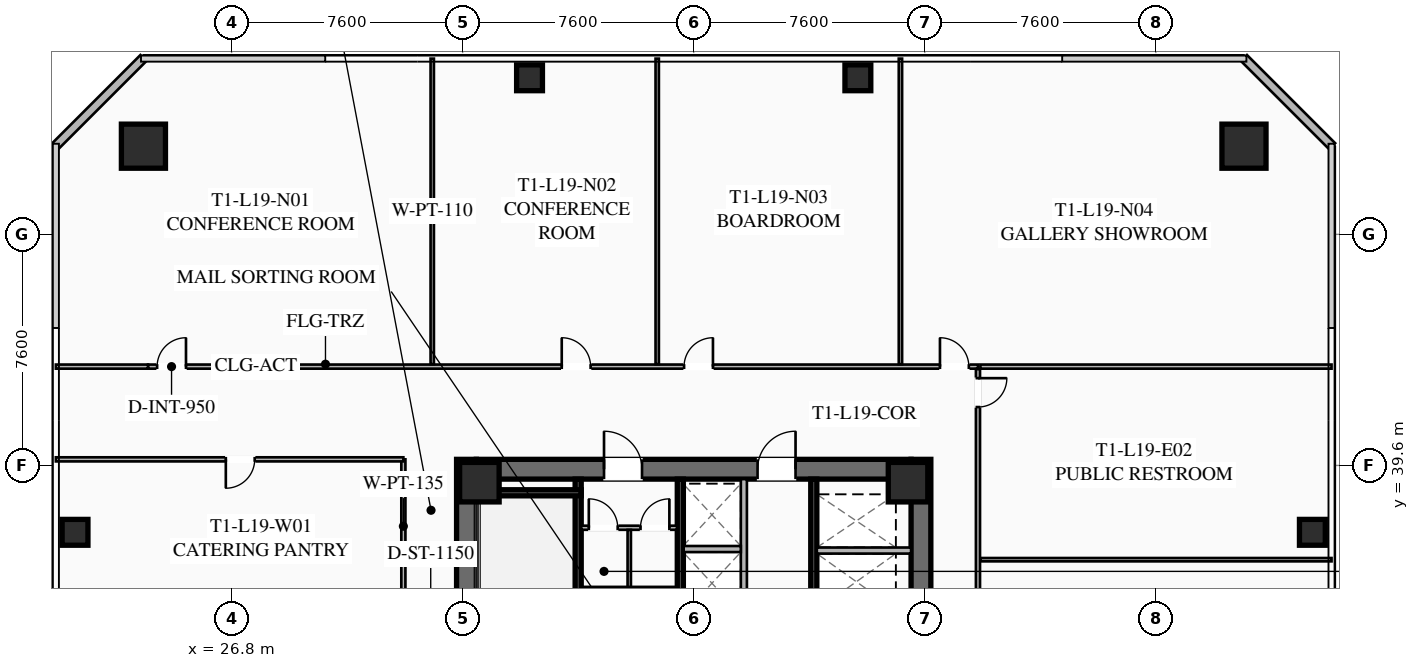
"""IFC4 building model, lengths in metres.
Left out: names, types, materials, properties, quantities, classifications, styles, units other than length and angle.
Written with IfcOpenShell. Run it as: python <this file> out.ifc"""

import sys

from ifc_helpers import new_model, si_unit, direction, frame, frame_2d, origin, origin_2d, place, context, subcontext, project, spatial, rectangle, hollow_rectangle, extrude, element, fill, save


model = new_model("IFC4")
c1 = context("Model", 3, precision=1e-05, world=origin(), true_north=direction((0.0, 1.0)))
c2 = subcontext(c1, "Body", "Model", "MODEL_VIEW")
j1 = project(units=[si_unit("LENGTHUNIT", "METRE"), si_unit("PLANEANGLEUNIT", "RADIAN")], contexts=[c1])
p1 = place(None, origin())
s1 = spatial("IfcSite", under=j1, at=p1, CompositionType="ELEMENT")
p2 = place(p1, origin())
s2 = spatial("IfcBuilding", under=s1, at=p2, CompositionType="ELEMENT")
p3 = place(p2, frame((0.0, 0.0, 74.3)))
s3 = spatial("IfcBuildingStorey", under=s2, at=p3, CompositionType="ELEMENT", Elevation=74.3)
for number, where, z_axis, x_axis in (
    (1, (34.525, 24.2, 0.0), (0.0, 0.0, 1.0), (0.0, 1.0, 0.0)),
    (2, (49.475, 39.8, 0.0), (0.0, 0.0, 1.0), (0.0, -1.0, 0.0)),
):
    element("IfcWall", number, at=place(p3, frame(where, z_axis=z_axis, x_axis=x_axis)), inside=s3, PredefinedType="SHEAR", context=c2, shape_type="SweptSolid", body=[
        extrude(rectangle(XDim=15.6, YDim=0.65, at=frame_2d((7.8, 0.0))), origin(), (0.0, 0.0, 1.0), 3.55),
    ])
p4 = place(p3, frame((34.85, 39.475, 0.0), z_axis=(0.0, 0.0, 1.0), x_axis=(1.0, 0.0, 0.0)))
e3 = element("IfcWall", 3, at=p4, inside=s3, PredefinedType="SHEAR", context=c2, shape_type="SweptSolid", body=[
    extrude(rectangle(XDim=14.3, YDim=0.65, at=frame_2d((7.15, 0.0))), origin(), (0.0, 0.0, 1.0), 3.55),
])
p5 = place(p4, frame((4.2, 0.0, 0.0)))
e4 = element("IfcOpeningElement", 4, at=p5, cuts=e3, PredefinedType="OPENING", context=c2, shape_type="SweptSolid", body=[
    extrude(rectangle(XDim=1.25, YDim=2.25, at=frame_2d((0.625, 1.125))), frame((0.0, 0.335, 0.0), z_axis=(0.0, -1.0, 0.0), x_axis=(1.0, 0.0, 0.0)), (0.0, 0.0, 1.0), 0.67),
])
p6 = place(p4, frame((9.25, 0.0, 0.0)))
e5 = element("IfcOpeningElement", 5, at=p6, cuts=e3, PredefinedType="OPENING", context=c2, shape_type="SweptSolid", body=[
    extrude(rectangle(XDim=1.25, YDim=2.25, at=frame_2d((0.625, 1.125))), frame((0.0, 0.335, 0.0), z_axis=(0.0, -1.0, 0.0), x_axis=(1.0, 0.0, 0.0)), (0.0, 0.0, 1.0), 0.67),
])
for number, where, z_axis, x_axis in (
    (6, (49.05, 39.05, 0.0), (0.0, 0.0, 1.0), (1.0, 0.0, 0.0)),
    (7, (34.95, 39.05, 0.0), (0.0, 0.0, 1.0), (1.0, 0.0, 0.0)),
):
    element("IfcColumn", number, at=place(p3, frame(where, z_axis=z_axis, x_axis=x_axis)), inside=s3, PredefinedType="COLUMN", context=c2, shape_type="SweptSolid", body=[
        extrude(hollow_rectangle(XDim=1.3, YDim=1.3, WallThickness=0.05, at=origin_2d()), origin(), (0.0, 0.0, 1.0), 3.35),
    ])
for number, where, z_axis, x_axis in (
    (8, (60.1, 50.1, 0.0), (0.0, 0.0, 1.0), (1.0, 0.0, 0.0)),
    (9, (23.9, 50.1, 0.0), (0.0, 0.0, 1.0), (1.0, 0.0, 0.0)),
):
    element("IfcColumn", number, at=place(p3, frame(where, z_axis=z_axis, x_axis=x_axis)), inside=s3, PredefinedType="COLUMN", context=c2, shape_type="SweptSolid", body=[
        extrude(hollow_rectangle(XDim=1.45, YDim=1.45, WallThickness=0.055, at=origin_2d()), origin(), (0.0, 0.0, 1.0), 3.35),
    ])
for number, where, z_axis, x_axis in (
    (10, (62.35, 37.4, 0.0), (0.0, 0.0, 1.0), (1.0, 0.0, 0.0)),
    (11, (47.4, 52.35, 0.0), (0.0, 0.0, 1.0), (1.0, 0.0, 0.0)),
    (12, (36.6, 52.35, 0.0), (0.0, 0.0, 1.0), (1.0, 0.0, 0.0)),
    (13, (21.65, 37.4, 0.0), (0.0, 0.0, 1.0), (1.0, 0.0, 0.0)),
):
    element("IfcColumn", number, at=place(p3, frame(where, z_axis=z_axis, x_axis=x_axis)), inside=s3, PredefinedType="COLUMN", context=c2, shape_type="SweptSolid", body=[
        extrude(hollow_rectangle(XDim=0.85, YDim=0.85, WallThickness=0.035, at=origin_2d()), origin(), (0.0, 0.0, 1.0), 3.35),
    ])
for number, where, z_axis, x_axis in (
    (14, (21.0, 50.1, 0.0), (0.0, 0.0, 1.0), (0.707, 0.707, 0.0)),
    (15, (60.1, 53.0, 0.0), (0.0, 0.0, 1.0), (0.707, -0.707, 0.0)),
):
    element("IfcWall", number, at=place(p3, frame(where, z_axis=z_axis, x_axis=x_axis)), inside=s3, PredefinedType="SOLIDWALL", context=c2, shape_type="SweptSolid", body=[
        extrude(rectangle(XDim=4.101, YDim=0.28, at=frame_2d((2.051, 0.0))), origin(), (0.0, 0.0, 1.0), 3.35),
    ])
p7 = place(p3, frame((38.2, 31.2, 0.0), z_axis=(0.0, 0.0, 1.0), x_axis=(0.0, 1.0, 0.0)))
e16 = element("IfcWall", 16, at=p7, inside=s3, PredefinedType="SHEAR", context=c2, shape_type="SweptSolid", body=[
    extrude(rectangle(XDim=7.95, YDim=0.2, at=frame_2d((3.975, 0.0))), origin(), (0.0, 0.0, 1.0), 3.35),
])
p8 = place(p7, frame((0.45, 0.0, 0.0)))
e17 = element("IfcOpeningElement", 17, at=p8, cuts=e16, PredefinedType="OPENING", context=c2, shape_type="SweptSolid", body=[
    extrude(rectangle(XDim=1.15, YDim=2.2, at=frame_2d((0.575, 1.1))), frame((0.0, 0.11, 0.0), z_axis=(0.0, -1.0, 0.0), x_axis=(1.0, 0.0, 0.0)), (0.0, 0.0, 1.0), 0.22),
])
p9 = place(p3, frame((34.85, 38.7, 0.0), z_axis=(0.0, 0.0, 1.0), x_axis=(1.0, 0.0, 0.0)))
e18 = element("IfcWall", 18, at=p9, inside=s3, PredefinedType="SHEAR", context=c2, shape_type="SweptSolid", body=[
    extrude(rectangle(XDim=3.45, YDim=0.2, at=frame_2d((1.725, 0.0))), origin(), (0.0, 0.0, 1.0), 3.35),
])
p10 = place(p3, frame((41.56, 24.85, 0.0), z_axis=(0.0, 0.0, 1.0), x_axis=(0.0, 1.0, 0.0)))
e19 = element("IfcWall", 19, at=p10, inside=s3, PredefinedType="SHEAR", context=c2, shape_type="SweptSolid", body=[
    extrude(rectangle(XDim=14.3, YDim=0.2, at=frame_2d((7.15, 0.0))), origin(), (0.0, 0.0, 1.0), 3.35),
])
p11 = place(p3, frame((45.95, 39.15, 0.0), z_axis=(0.0, 0.0, 1.0), x_axis=(0.0, -1.0, 0.0)))
e20 = element("IfcWall", 20, at=p11, inside=s3, PredefinedType="SHEAR", context=c2, shape_type="SweptSolid", body=[
    extrude(rectangle(XDim=6.35, YDim=0.2, at=frame_2d((3.175, 0.0))), origin(), (0.0, 0.0, 1.0), 3.35),
])
p12 = place(p3, frame((46.05, 36.8, 0.0), z_axis=(0.0, 0.0, 1.0), x_axis=(1.0, 0.0, 0.0)))
e21 = element("IfcWall", 21, at=p12, inside=s3, PredefinedType="SOLIDWALL", context=c2, shape_type="SweptSolid", body=[
    extrude(rectangle(XDim=3.1, YDim=0.2, at=frame_2d((1.55, 0.0))), origin(), (0.0, 0.0, 1.0), 3.35),
])
p13 = place(p3, frame((38.3, 37.55, 0.0), z_axis=(0.0, 0.0, 1.0), x_axis=(1.0, 0.0, 0.0)))
e22 = element("IfcWall", 22, at=p13, inside=s3, PredefinedType="PARTITIONING", context=c2, shape_type="SweptSolid", body=[
    extrude(rectangle(XDim=3.15, YDim=0.135, at=frame_2d((1.575, 0.0))), origin(), (0.0, 0.0, 1.0), 2.703),
])
p14 = place(p13, frame((0.25, 0.0, 0.0)))
e23 = element("IfcOpeningElement", 23, at=p14, cuts=e22, PredefinedType="OPENING", context=c2, shape_type="SweptSolid", body=[
    extrude(rectangle(XDim=0.95, YDim=2.05, at=frame_2d((0.475, 1.025))), frame((0.0, 0.077, 0.0), z_axis=(0.0, -1.0, 0.0), x_axis=(1.0, 0.0, 0.0)), (0.0, 0.0, 1.0), 0.155),
])
p15 = place(p13, frame((1.95, 0.0, 0.0)))
e24 = element("IfcOpeningElement", 24, at=p15, cuts=e22, PredefinedType="OPENING", context=c2, shape_type="SweptSolid", body=[
    extrude(rectangle(XDim=0.95, YDim=2.05, at=frame_2d((0.475, 1.025))), frame((0.0, 0.077, 0.0), z_axis=(0.0, -1.0, 0.0), x_axis=(1.0, 0.0, 0.0)), (0.0, 0.0, 1.0), 0.155),
])
p16 = place(p3, frame((39.88, 33.68, 0.0), z_axis=(0.0, 0.0, 1.0), x_axis=(0.0, 1.0, 0.0)))
e25 = element("IfcWall", 25, at=p16, inside=s3, PredefinedType="PARTITIONING", context=c2, shape_type="SweptSolid", body=[
    extrude(rectangle(XDim=3.8, YDim=0.11, at=frame_2d((1.9, 0.0))), origin(), (0.0, 0.0, 1.0), 2.703),
])
p17 = place(p3, frame((38.3, 35.55, 0.0), z_axis=(0.0, 0.0, 1.0), x_axis=(1.0, 0.0, 0.0)))
e26 = element("IfcWall", 26, at=p17, inside=s3, PredefinedType="PARTITIONING", context=c2, shape_type="SweptSolid", body=[
    extrude(rectangle(XDim=3.15, YDim=0.11, at=frame_2d((1.575, 0.0))), origin(), (0.0, 0.0, 1.0), 2.703),
])
p18 = place(p3, frame((43.65, 32.35, 0.0), z_axis=(0.0, 0.0, 1.0), x_axis=(0.0, 1.0, 0.0)))
e27 = element("IfcWall", 27, at=p18, inside=s3, PredefinedType="SOLIDWALL", context=c2, shape_type="SweptSolid", body=[
    extrude(rectangle(XDim=6.8, YDim=0.2, at=frame_2d((3.4, 0.0))), origin(), (0.0, 0.0, 1.0), 3.35),
])
p19 = place(p3, frame((41.67, 36.85, 0.0), z_axis=(0.0, 0.0, 1.0), x_axis=(1.0, 0.0, 0.0)))
e28 = element("IfcWall", 28, at=p19, inside=s3, PredefinedType="SOLIDWALL", context=c2, shape_type="SweptSolid", body=[
    extrude(rectangle(XDim=1.88, YDim=0.2, at=frame_2d((0.94, 0.0))), origin(), (0.0, 0.0, 1.0), 3.35),
])
p20 = place(p3, frame((32.45, 35.4, 0.0), z_axis=(0.0, 0.0, 1.0), x_axis=(0.0, 1.0, 0.0)))
e29 = element("IfcWall", 29, at=p20, inside=s3, PredefinedType="PARTITIONING", context=c2, shape_type="SweptSolid", body=[
    extrude(rectangle(XDim=4.4, YDim=0.135, at=frame_2d((2.2, 0.0))), origin(), (0.0, 0.0, 1.0), 2.703),
])
p21 = place(p3, frame((24.05, 42.85, 0.0), z_axis=(0.0, 0.0, 1.0), x_axis=(1.0, 0.0, 0.0)))
e30 = element("IfcWall", 30, at=p21, inside=s3, PredefinedType="PARTITIONING", context=c2, shape_type="SweptSolid", body=[
    extrude(rectangle(XDim=27.3, YDim=0.135, at=frame_2d((13.65, 0.0))), origin(), (0.0, 0.0, 1.0), 2.703),
])
p22 = place(p21, frame((0.3, 0.0, 0.0)))
e31 = element("IfcOpeningElement", 31, at=p22, cuts=e30, PredefinedType="OPENING", context=c2, shape_type="SweptSolid", body=[
    extrude(rectangle(XDim=0.95, YDim=2.05, at=frame_2d((0.475, 1.025))), frame((0.0, 0.077, 0.0), z_axis=(0.0, -1.0, 0.0), x_axis=(1.0, 0.0, 0.0)), (0.0, 0.0, 1.0), 0.155),
])
p23 = place(p21, frame((13.61, 0.0, 0.0)))
e32 = element("IfcOpeningElement", 32, at=p23, cuts=e30, PredefinedType="OPENING", context=c2, shape_type="SweptSolid", body=[
    extrude(rectangle(XDim=0.95, YDim=2.05, at=frame_2d((0.475, 1.025))), frame((0.0, 0.077, 0.0), z_axis=(0.0, -1.0, 0.0), x_axis=(1.0, 0.0, 0.0)), (0.0, 0.0, 1.0), 0.155),
])
p24 = place(p21, frame((17.633, 0.0, 0.0)))
e33 = element("IfcOpeningElement", 33, at=p24, cuts=e30, PredefinedType="OPENING", context=c2, shape_type="SweptSolid", body=[
    extrude(rectangle(XDim=0.95, YDim=2.05, at=frame_2d((0.475, 1.025))), frame((0.0, 0.077, 0.0), z_axis=(0.0, -1.0, 0.0), x_axis=(1.0, 0.0, 0.0)), (0.0, 0.0, 1.0), 0.155),
])
p25 = place(p21, frame((26.05, 0.0, 0.0)))
e34 = element("IfcOpeningElement", 34, at=p25, cuts=e30, PredefinedType="OPENING", context=c2, shape_type="SweptSolid", body=[
    extrude(rectangle(XDim=0.95, YDim=2.05, at=frame_2d((0.475, 1.025))), frame((0.0, 0.077, 0.0), z_axis=(0.0, -1.0, 0.0), x_axis=(1.0, 0.0, 0.0)), (0.0, 0.0, 1.0), 0.155),
])
p26 = place(p3, frame((21.02, 42.85, 0.0), z_axis=(0.0, 0.0, 1.0), x_axis=(1.0, 0.0, 0.0)))
e35 = element("IfcWall", 35, at=p26, inside=s3, PredefinedType="PARTITIONING", context=c2, shape_type="SweptSolid", body=[
    extrude(rectangle(XDim=3.03, YDim=0.135, at=frame_2d((1.515, 0.0))), origin(), (0.0, 0.0, 1.0), 2.703),
])
for number, where, z_axis, x_axis in (
    (36, (33.4, 42.93, 0.0), (0.0, 0.0, 1.0), (0.0, 1.0, 0.0)),
    (37, (40.8, 42.93, 0.0), (0.0, 0.0, 1.0), (0.0, 1.0, 0.0)),
    (38, (48.8, 42.93, 0.0), (0.0, 0.0, 1.0), (0.0, 1.0, 0.0)),
):
    element("IfcWall", number, at=place(p3, frame(where, z_axis=z_axis, x_axis=x_axis)), inside=s3, PredefinedType="PARTITIONING", context=c2, shape_type="SweptSolid", body=[
        extrude(rectangle(XDim=10.05, YDim=0.11, at=frame_2d((5.025, 0.0))), origin(), (0.0, 0.0, 1.0), 2.703),
    ])
p27 = place(p3, frame((51.35, 42.77, 0.0), z_axis=(0.0, 0.0, 1.0), x_axis=(0.0, -1.0, 0.0)))
e39 = element("IfcWall", 39, at=p27, inside=s3, PredefinedType="PARTITIONING", context=c2, shape_type="SweptSolid", body=[
    extrude(rectangle(XDim=20.26, YDim=0.135, at=frame_2d((10.13, 0.0))), origin(), (0.0, 0.0, 1.0), 2.703),
])
p28 = place(p27, frame((10.181, 0.0, 0.0)))
e40 = element("IfcOpeningElement", 40, at=p28, cuts=e39, PredefinedType="OPENING", context=c2, shape_type="SweptSolid", body=[
    extrude(rectangle(XDim=0.95, YDim=2.05, at=frame_2d((0.475, 1.025))), frame((0.0, 0.077, 0.0), z_axis=(0.0, -1.0, 0.0), x_axis=(1.0, 0.0, 0.0)), (0.0, 0.0, 1.0), 0.155),
])
p29 = place(p27, frame((0.3, 0.0, 0.0)))
e41 = element("IfcOpeningElement", 41, at=p29, cuts=e39, PredefinedType="OPENING", context=c2, shape_type="SweptSolid", body=[
    extrude(rectangle(XDim=0.95, YDim=2.05, at=frame_2d((0.475, 1.025))), frame((0.0, 0.077, 0.0), z_axis=(0.0, -1.0, 0.0), x_axis=(1.0, 0.0, 0.0)), (0.0, 0.0, 1.0), 0.155),
])
p30 = place(p3, frame((62.98, 42.85, 0.0), z_axis=(0.0, 0.0, 1.0), x_axis=(-1.0, 0.0, 0.0)))
e42 = element("IfcWall", 42, at=p30, inside=s3, PredefinedType="PARTITIONING", context=c2, shape_type="SweptSolid", body=[
    extrude(rectangle(XDim=11.55, YDim=0.135, at=frame_2d((5.775, 0.0))), origin(), (0.0, 0.0, 1.0), 2.703),
])
p31 = place(p3, frame((51.43, 36.5, 0.0), z_axis=(0.0, 0.0, 1.0), x_axis=(1.0, 0.0, 0.0)))
e43 = element("IfcWall", 43, at=p31, inside=s3, PredefinedType="PARTITIONING", context=c2, shape_type="SweptSolid", body=[
    extrude(rectangle(XDim=11.55, YDim=0.11, at=frame_2d((5.775, 0.0))), origin(), (0.0, 0.0, 1.0), 2.703),
])
p32 = place(p3, frame((32.45, 39.8, 0.0), z_axis=(0.0, 0.0, 1.0), x_axis=(-1.0, 0.0, 0.0)))
e44 = element("IfcWall", 44, at=p32, inside=s3, PredefinedType="PARTITIONING", context=c2, shape_type="SweptSolid", body=[
    extrude(rectangle(XDim=11.43, YDim=0.135, at=frame_2d((5.715, 0.0))), origin(), (0.0, 0.0, 1.0), 2.703),
])
p33 = place(p32, frame((4.89, 0.0, 0.0)))
e45 = element("IfcOpeningElement", 45, at=p33, cuts=e44, PredefinedType="OPENING", context=c2, shape_type="SweptSolid", body=[
    extrude(rectangle(XDim=0.95, YDim=2.05, at=frame_2d((0.475, 1.025))), frame((0.0, 0.077, 0.0), z_axis=(0.0, -1.0, 0.0), x_axis=(1.0, 0.0, 0.0)), (0.0, 0.0, 1.0), 0.155),
])
p34 = place(p5, origin())
e46 = element("IfcDoor", 46, at=p34, inside=s3, OperationType="SINGLE_SWING_LEFT", PredefinedType="DOOR", context=c2, shape_type="SweptSolid", body=[
    extrude(rectangle(XDim=1.25, YDim=2.25, at=frame_2d((0.625, 1.125))), frame((0.0, 0.025, 0.0), z_axis=(0.0, -1.0, 0.0), x_axis=(1.0, 0.0, 0.0)), (0.0, 0.0, 1.0), 0.05),
])
fill(e4, e46)
p35 = place(p6, origin())
e47 = element("IfcDoor", 47, at=p35, inside=s3, OperationType="SINGLE_SWING_RIGHT", PredefinedType="DOOR", context=c2, shape_type="SweptSolid", body=[
    extrude(rectangle(XDim=1.25, YDim=2.25, at=frame_2d((0.625, 1.125))), frame((0.0, 0.025, 0.0), z_axis=(0.0, -1.0, 0.0), x_axis=(1.0, 0.0, 0.0)), (0.0, 0.0, 1.0), 0.05),
])
fill(e5, e47)
p36 = place(p14, origin())
e48 = element("IfcDoor", 48, at=p36, inside=s3, OperationType="SINGLE_SWING_LEFT", PredefinedType="DOOR", context=c2, shape_type="SweptSolid", body=[
    extrude(rectangle(XDim=0.95, YDim=2.05, at=frame_2d((0.475, 1.025))), frame((0.0, 0.025, 0.0), z_axis=(0.0, -1.0, 0.0), x_axis=(1.0, 0.0, 0.0)), (0.0, 0.0, 1.0), 0.05),
])
fill(e23, e48)
p37 = place(p15, origin())
e49 = element("IfcDoor", 49, at=p37, inside=s3, OperationType="SINGLE_SWING_RIGHT", PredefinedType="DOOR", context=c2, shape_type="SweptSolid", body=[
    extrude(rectangle(XDim=0.95, YDim=2.05, at=frame_2d((0.475, 1.025))), frame((0.0, 0.025, 0.0), z_axis=(0.0, -1.0, 0.0), x_axis=(1.0, 0.0, 0.0)), (0.0, 0.0, 1.0), 0.05),
])
fill(e24, e49)
p38 = place(p22, origin())
e50 = element("IfcDoor", 50, at=p38, inside=s3, OperationType="SINGLE_SWING_RIGHT", PredefinedType="DOOR", context=c2, shape_type="SweptSolid", body=[
    extrude(rectangle(XDim=0.95, YDim=2.05, at=frame_2d((0.475, 1.025))), frame((0.0, 0.025, 0.0), z_axis=(0.0, -1.0, 0.0), x_axis=(1.0, 0.0, 0.0)), (0.0, 0.0, 1.0), 0.05),
])
fill(e31, e50)
p39 = place(p23, origin())
e51 = element("IfcDoor", 51, at=p39, inside=s3, OperationType="SINGLE_SWING_LEFT", PredefinedType="DOOR", context=c2, shape_type="SweptSolid", body=[
    extrude(rectangle(XDim=0.95, YDim=2.05, at=frame_2d((0.475, 1.025))), frame((0.0, 0.025, 0.0), z_axis=(0.0, -1.0, 0.0), x_axis=(1.0, 0.0, 0.0)), (0.0, 0.0, 1.0), 0.05),
])
fill(e32, e51)
p40 = place(p24, origin())
e52 = element("IfcDoor", 52, at=p40, inside=s3, OperationType="SINGLE_SWING_RIGHT", PredefinedType="DOOR", context=c2, shape_type="SweptSolid", body=[
    extrude(rectangle(XDim=0.95, YDim=2.05, at=frame_2d((0.475, 1.025))), frame((0.0, 0.025, 0.0), z_axis=(0.0, -1.0, 0.0), x_axis=(1.0, 0.0, 0.0)), (0.0, 0.0, 1.0), 0.05),
])
fill(e33, e52)
p41 = place(p25, origin())
e53 = element("IfcDoor", 53, at=p41, inside=s3, OperationType="SINGLE_SWING_LEFT", PredefinedType="DOOR", context=c2, shape_type="SweptSolid", body=[
    extrude(rectangle(XDim=0.95, YDim=2.05, at=frame_2d((0.475, 1.025))), frame((0.0, 0.025, 0.0), z_axis=(0.0, -1.0, 0.0), x_axis=(1.0, 0.0, 0.0)), (0.0, 0.0, 1.0), 0.05),
])
fill(e34, e53)
p42 = place(p29, origin())
e54 = element("IfcDoor", 54, at=p42, inside=s3, OperationType="SINGLE_SWING_LEFT", PredefinedType="DOOR", context=c2, shape_type="SweptSolid", body=[
    extrude(rectangle(XDim=0.95, YDim=2.05, at=frame_2d((0.475, 1.025))), frame((0.0, 0.025, 0.0), z_axis=(0.0, -1.0, 0.0), x_axis=(1.0, 0.0, 0.0)), (0.0, 0.0, 1.0), 0.05),
])
fill(e41, e54)
p43 = place(p33, origin())
e55 = element("IfcDoor", 55, at=p43, inside=s3, OperationType="SINGLE_SWING_RIGHT", PredefinedType="DOOR", context=c2, shape_type="SweptSolid", body=[
    extrude(rectangle(XDim=0.95, YDim=2.05, at=frame_2d((0.475, 1.025))), frame((0.0, 0.025, 0.0), z_axis=(0.0, -1.0, 0.0), x_axis=(1.0, 0.0, 0.0)), (0.0, 0.0, 1.0), 0.05),
])
fill(e45, e55)
save(model, sys.argv[1])
